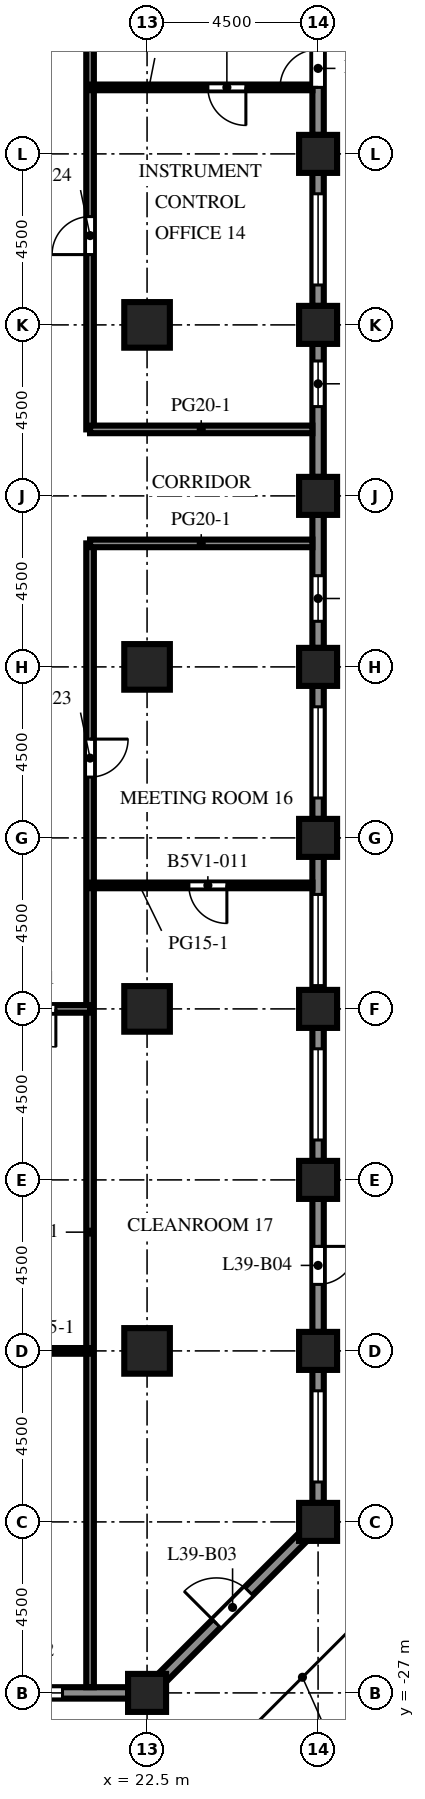
"""IFC4 building model, lengths in metres.
Left out: names, types, materials, properties, quantities, classifications, styles, units other than length and angle.
Written with IfcOpenShell. Run it as: python <this file> out.ifc"""

import sys

from ifc_helpers import new_model, si_unit, direction, frame, frame_2d, origin, origin_2d, place, context, subcontext, project, spatial, rectangle, extrude, element, fill, save


model = new_model("IFC4")
c1 = context("Model", 3, precision=1e-05, world=origin(), true_north=direction((0.0, 1.0)))
c2 = subcontext(c1, "Body", "Model", "MODEL_VIEW")
j1 = project(units=[si_unit("LENGTHUNIT", "METRE"), si_unit("PLANEANGLEUNIT", "RADIAN")], contexts=[c1])
p1 = place(None, origin())
s1 = spatial("IfcSite", under=j1, at=p1, CompositionType="ELEMENT")
p2 = place(p1, origin())
s2 = spatial("IfcBuilding", under=s1, at=p2, CompositionType="ELEMENT")
p3 = place(p2, frame((0.0, 0.0, 173.2)))
s3 = spatial("IfcBuildingStorey", under=s2, at=p3, CompositionType="ELEMENT", Elevation=173.2)
for number, where, z_axis, x_axis in (
    (1, (22.5, -27.0, 0.0), (0.0, 0.0, 1.0), (1.0, 0.0, 0.0)),
    (2, (27.0, -22.5, 0.0), (0.0, 0.0, 1.0), (1.0, 0.0, 0.0)),
    (3, (27.0, -18.0, 0.0), (0.0, 0.0, 1.0), (1.0, 0.0, 0.0)),
    (4, (27.0, -13.5, 0.0), (0.0, 0.0, 1.0), (1.0, 0.0, 0.0)),
    (5, (27.0, -9.0, 0.0), (0.0, 0.0, 1.0), (1.0, 0.0, 0.0)),
    (6, (27.0, -4.5, 0.0), (0.0, 0.0, 1.0), (1.0, 0.0, 0.0)),
    (7, (27.0, 0.0, 0.0), (0.0, 0.0, 1.0), (1.0, 0.0, 0.0)),
    (8, (27.0, 4.5, 0.0), (0.0, 0.0, 1.0), (1.0, 0.0, 0.0)),
    (9, (27.0, 9.0, 0.0), (0.0, 0.0, 1.0), (1.0, 0.0, 0.0)),
    (10, (27.0, 13.5, 0.0), (0.0, 0.0, 1.0), (1.0, 0.0, 0.0)),
):
    element("IfcColumn", number, at=place(p3, frame(where, z_axis=z_axis, x_axis=x_axis)), inside=s3, PredefinedType="COLUMN", context=c2, shape_type="SweptSolid", body=[
        extrude(rectangle(XDim=1.0, YDim=1.0, at=origin_2d()), origin(), (0.0, 0.0, 1.0), 4.1),
    ])
for number, where, z_axis, x_axis in (
    (11, (22.5, -18.0, 0.0), (0.0, 0.0, 1.0), (1.0, 0.0, 0.0)),
    (12, (22.5, -9.0, 0.0), (0.0, 0.0, 1.0), (1.0, 0.0, 0.0)),
    (13, (22.5, 0.0, 0.0), (0.0, 0.0, 1.0), (1.0, 0.0, 0.0)),
    (14, (22.5, 9.0, 0.0), (0.0, 0.0, 1.0), (1.0, 0.0, 0.0)),
):
    element("IfcColumn", number, at=place(p3, frame(where, z_axis=z_axis, x_axis=x_axis)), inside=s3, PredefinedType="COLUMN", context=c2, shape_type="SweptSolid", body=[
        extrude(rectangle(XDim=1.2, YDim=1.2, at=origin_2d()), origin(), (0.0, 0.0, 1.0), 4.1),
    ])
p4 = place(p3, frame((22.0, -27.0, 0.0), z_axis=(0.0, 0.0, 1.0), x_axis=(-1.0, 0.0, 0.0)))
e15 = element("IfcWall", 15, at=p4, inside=s3, PredefinedType="SOLIDWALL", context=c2, shape_type="SweptSolid", body=[
    extrude(rectangle(XDim=3.5, YDim=0.3, at=frame_2d((1.75, 0.0))), origin(), (0.0, 0.0, 1.0), 2.85),
])
p5 = place(p4, frame((1.725, 0.0, 0.8)))
e16 = element("IfcOpeningElement", 16, at=p5, cuts=e15, PredefinedType="OPENING", context=c2, shape_type="SweptSolid", body=[
    extrude(rectangle(XDim=1.2, YDim=1.7, at=frame_2d((0.6, 0.85))), frame((0.0, 0.16, 0.0), z_axis=(0.0, -1.0, 0.0), x_axis=(1.0, 0.0, 0.0)), (0.0, 0.0, 1.0), 0.32),
])
p6 = place(p3, frame((26.606, -22.894, 0.0), z_axis=(0.0, 0.0, 1.0), x_axis=(-0.707106781187, -0.707106781187, 0.0)))
e17 = element("IfcWall", 17, at=p6, inside=s3, PredefinedType="SOLIDWALL", context=c2, shape_type="SweptSolid", body=[
    extrude(rectangle(XDim=5.25, YDim=0.3, at=frame_2d((2.625, 0.0))), origin(), (0.0, 0.0, 1.0), 2.85),
])
p7 = place(p6, frame((2.025, 0.0, 0.0)))
e18 = element("IfcOpeningElement", 18, at=p7, cuts=e17, PredefinedType="OPENING", context=c2, shape_type="SweptSolid", body=[
    extrude(rectangle(XDim=1.2, YDim=2.2, at=frame_2d((0.6, 1.1))), frame((0.0, 0.16, 0.0), z_axis=(0.0, -1.0, 0.0), x_axis=(1.0, 0.0, 0.0)), (0.0, 0.0, 1.0), 0.32),
])
p8 = place(p3, frame((27.0, -18.5, 0.0), z_axis=(0.0, 0.0, 1.0), x_axis=(0.0, -1.0, 0.0)))
e19 = element("IfcWall", 19, at=p8, inside=s3, PredefinedType="SOLIDWALL", context=c2, shape_type="SweptSolid", body=[
    extrude(rectangle(XDim=3.5, YDim=0.3, at=frame_2d((1.75, 0.0))), origin(), (0.0, 0.0, 1.0), 2.85),
])
p9 = place(p8, frame((0.55, 0.0, 0.8)))
e20 = element("IfcOpeningElement", 20, at=p9, cuts=e19, PredefinedType="OPENING", context=c2, shape_type="SweptSolid", body=[
    extrude(rectangle(XDim=2.4, YDim=1.7, at=frame_2d((1.2, 0.85))), frame((0.0, 0.16, 0.0), z_axis=(0.0, -1.0, 0.0), x_axis=(1.0, 0.0, 0.0)), (0.0, 0.0, 1.0), 0.32),
])
p10 = place(p3, frame((27.0, -14.0, 0.0), z_axis=(0.0, 0.0, 1.0), x_axis=(0.0, -1.0, 0.0)))
e21 = element("IfcWall", 21, at=p10, inside=s3, PredefinedType="SOLIDWALL", context=c2, shape_type="SweptSolid", body=[
    extrude(rectangle(XDim=3.5, YDim=0.3, at=frame_2d((1.75, 0.0))), origin(), (0.0, 0.0, 1.0), 2.85),
])
p11 = place(p10, frame((1.25, 0.0, 0.0)))
e22 = element("IfcOpeningElement", 22, at=p11, cuts=e21, PredefinedType="OPENING", context=c2, shape_type="SweptSolid", body=[
    extrude(rectangle(XDim=1.0, YDim=2.2, at=frame_2d((0.5, 1.1))), frame((0.0, 0.16, 0.0), z_axis=(0.0, -1.0, 0.0), x_axis=(1.0, 0.0, 0.0)), (0.0, 0.0, 1.0), 0.32),
])
p12 = place(p3, frame((27.0, -9.5, 0.0), z_axis=(0.0, 0.0, 1.0), x_axis=(0.0, -1.0, 0.0)))
e23 = element("IfcWall", 23, at=p12, inside=s3, PredefinedType="SOLIDWALL", context=c2, shape_type="SweptSolid", body=[
    extrude(rectangle(XDim=3.5, YDim=0.3, at=frame_2d((1.75, 0.0))), origin(), (0.0, 0.0, 1.0), 2.85),
])
p13 = place(p12, frame((0.55, 0.0, 0.8)))
e24 = element("IfcOpeningElement", 24, at=p13, cuts=e23, PredefinedType="OPENING", context=c2, shape_type="SweptSolid", body=[
    extrude(rectangle(XDim=2.4, YDim=1.7, at=frame_2d((1.2, 0.85))), frame((0.0, 0.16, 0.0), z_axis=(0.0, -1.0, 0.0), x_axis=(1.0, 0.0, 0.0)), (0.0, 0.0, 1.0), 0.32),
])
p14 = place(p3, frame((27.0, -5.0, 0.0), z_axis=(0.0, 0.0, 1.0), x_axis=(0.0, -1.0, 0.0)))
e25 = element("IfcWall", 25, at=p14, inside=s3, PredefinedType="SOLIDWALL", context=c2, shape_type="SweptSolid", body=[
    extrude(rectangle(XDim=3.5, YDim=0.3, at=frame_2d((1.75, 0.0))), origin(), (0.0, 0.0, 1.0), 2.85),
])
p15 = place(p14, frame((0.988, 0.0, 0.8)))
e26 = element("IfcOpeningElement", 26, at=p15, cuts=e25, PredefinedType="OPENING", context=c2, shape_type="SweptSolid", body=[
    extrude(rectangle(XDim=2.4, YDim=1.7, at=frame_2d((1.2, 0.85))), frame((0.0, 0.16, 0.0), z_axis=(0.0, -1.0, 0.0), x_axis=(1.0, 0.0, 0.0)), (0.0, 0.0, 1.0), 0.32),
])
p16 = place(p3, frame((27.0, -0.5, 0.0), z_axis=(0.0, 0.0, 1.0), x_axis=(0.0, -1.0, 0.0)))
e27 = element("IfcWall", 27, at=p16, inside=s3, PredefinedType="SOLIDWALL", context=c2, shape_type="SweptSolid", body=[
    extrude(rectangle(XDim=3.5, YDim=0.3, at=frame_2d((1.75, 0.0))), origin(), (0.0, 0.0, 1.0), 2.85),
])
p17 = place(p16, frame((0.55, 0.0, 0.8)))
e28 = element("IfcOpeningElement", 28, at=p17, cuts=e27, PredefinedType="OPENING", context=c2, shape_type="SweptSolid", body=[
    extrude(rectangle(XDim=2.4, YDim=1.7, at=frame_2d((1.2, 0.85))), frame((0.0, 0.16, 0.0), z_axis=(0.0, -1.0, 0.0), x_axis=(1.0, 0.0, 0.0)), (0.0, 0.0, 1.0), 0.32),
])
p18 = place(p3, frame((27.0, 4.0, 0.0), z_axis=(0.0, 0.0, 1.0), x_axis=(0.0, -1.0, 0.0)))
e29 = element("IfcWall", 29, at=p18, inside=s3, PredefinedType="SOLIDWALL", context=c2, shape_type="SweptSolid", body=[
    extrude(rectangle(XDim=3.5, YDim=0.3, at=frame_2d((1.75, 0.0))), origin(), (0.0, 0.0, 1.0), 2.85),
])
p19 = place(p18, frame((1.6, 0.0, 0.8)))
e30 = element("IfcOpeningElement", 30, at=p19, cuts=e29, PredefinedType="OPENING", context=c2, shape_type="SweptSolid", body=[
    extrude(rectangle(XDim=1.2, YDim=1.7, at=frame_2d((0.6, 0.85))), frame((0.0, 0.16, 0.0), z_axis=(0.0, -1.0, 0.0), x_axis=(1.0, 0.0, 0.0)), (0.0, 0.0, 1.0), 0.32),
])
p20 = place(p3, frame((27.0, 8.5, 0.0), z_axis=(0.0, 0.0, 1.0), x_axis=(0.0, -1.0, 0.0)))
e31 = element("IfcWall", 31, at=p20, inside=s3, PredefinedType="SOLIDWALL", context=c2, shape_type="SweptSolid", body=[
    extrude(rectangle(XDim=3.5, YDim=0.3, at=frame_2d((1.75, 0.0))), origin(), (0.0, 0.0, 1.0), 2.85),
])
p21 = place(p20, frame((0.45, 0.0, 0.8)))
e32 = element("IfcOpeningElement", 32, at=p21, cuts=e31, PredefinedType="OPENING", context=c2, shape_type="SweptSolid", body=[
    extrude(rectangle(XDim=1.2, YDim=1.7, at=frame_2d((0.6, 0.85))), frame((0.0, 0.16, 0.0), z_axis=(0.0, -1.0, 0.0), x_axis=(1.0, 0.0, 0.0)), (0.0, 0.0, 1.0), 0.32),
])
p22 = place(p3, frame((27.0, 13.0, 0.0), z_axis=(0.0, 0.0, 1.0), x_axis=(0.0, -1.0, 0.0)))
e33 = element("IfcWall", 33, at=p22, inside=s3, PredefinedType="SOLIDWALL", context=c2, shape_type="SweptSolid", body=[
    extrude(rectangle(XDim=3.5, YDim=0.3, at=frame_2d((1.75, 0.0))), origin(), (0.0, 0.0, 1.0), 2.85),
])
p23 = place(p22, frame((0.55, 0.0, 0.8)))
e34 = element("IfcOpeningElement", 34, at=p23, cuts=e33, PredefinedType="OPENING", context=c2, shape_type="SweptSolid", body=[
    extrude(rectangle(XDim=2.4, YDim=1.7, at=frame_2d((1.2, 0.85))), frame((0.0, 0.16, 0.0), z_axis=(0.0, -1.0, 0.0), x_axis=(1.0, 0.0, 0.0)), (0.0, 0.0, 1.0), 0.32),
])
p24 = place(p3, frame((27.0, 17.5, 0.0), z_axis=(0.0, 0.0, 1.0), x_axis=(0.0, -1.0, 0.0)))
e35 = element("IfcWall", 35, at=p24, inside=s3, PredefinedType="SOLIDWALL", context=c2, shape_type="SweptSolid", body=[
    extrude(rectangle(XDim=3.5, YDim=0.3, at=frame_2d((1.75, 0.0))), origin(), (0.0, 0.0, 1.0), 2.85),
])
p25 = place(p24, frame((1.25, 0.0, 0.0)))
e36 = element("IfcOpeningElement", 36, at=p25, cuts=e35, PredefinedType="OPENING", context=c2, shape_type="SweptSolid", body=[
    extrude(rectangle(XDim=1.0, YDim=2.2, at=frame_2d((0.5, 1.1))), frame((0.0, 0.16, 0.0), z_axis=(0.0, -1.0, 0.0), x_axis=(1.0, 0.0, 0.0)), (0.0, 0.0, 1.0), 0.32),
])
p26 = place(p3, frame((21.0, 3.25, 0.0), z_axis=(0.0, 0.0, 1.0), x_axis=(0.0, -1.0, 0.0)))
e37 = element("IfcWall", 37, at=p26, inside=s3, PredefinedType="PARTITIONING", context=c2, shape_type="SweptSolid", body=[
    extrude(rectangle(XDim=30.1, YDim=0.2, at=frame_2d((15.05, 0.0))), origin(), (0.0, 0.0, 1.0), 3.65),
])
p27 = place(p26, frame((5.15, 0.0, 0.0)))
e38 = element("IfcOpeningElement", 38, at=p27, cuts=e37, PredefinedType="OPENING", context=c2, shape_type="SweptSolid", body=[
    extrude(rectangle(XDim=1.0, YDim=2.1, at=frame_2d((0.5, 1.05))), frame((0.0, 0.11, 0.0), z_axis=(0.0, -1.0, 0.0), x_axis=(1.0, 0.0, 0.0)), (0.0, 0.0, 1.0), 0.22),
])
p28 = place(p3, frame((21.0, 26.85, 0.0), z_axis=(0.0, 0.0, 1.0), x_axis=(0.0, -1.0, 0.0)))
e39 = element("IfcWall", 39, at=p28, inside=s3, PredefinedType="PARTITIONING", context=c2, shape_type="SweptSolid", body=[
    extrude(rectangle(XDim=20.6, YDim=0.2, at=frame_2d((10.3, 0.0))), origin(), (0.0, 0.0, 1.0), 3.65),
])
p29 = place(p28, frame((15.0, 0.0, 0.0)))
e40 = element("IfcOpeningElement", 40, at=p29, cuts=e39, PredefinedType="OPENING", context=c2, shape_type="SweptSolid", body=[
    extrude(rectangle(XDim=1.0, YDim=2.1, at=frame_2d((0.5, 1.05))), frame((0.0, 0.11, 0.0), z_axis=(0.0, -1.0, 0.0), x_axis=(1.0, 0.0, 0.0)), (0.0, 0.0, 1.0), 0.22),
])
p30 = place(p3, frame((18.6, -18.0, 0.0), z_axis=(0.0, 0.0, 1.0), x_axis=(1.0, 0.0, 0.0)))
e41 = element("IfcWall", 41, at=p30, inside=s3, PredefinedType="PARTITIONING", context=c2, shape_type="SweptSolid", body=[
    extrude(rectangle(XDim=2.4, YDim=0.15, at=frame_2d((1.2, 0.0))), origin(), (0.0, 0.0, 1.0), 3.65),
])
p31 = place(p3, frame((21.0, -9.0, 0.0), z_axis=(0.0, 0.0, 1.0), x_axis=(-1.0, 0.0, 0.0)))
e42 = element("IfcWall", 42, at=p31, inside=s3, PredefinedType="PARTITIONING", context=c2, shape_type="SweptSolid", body=[
    extrude(rectangle(XDim=3.0, YDim=0.2, at=frame_2d((1.5, 0.0))), origin(), (0.0, 0.0, 1.0), 3.65),
])
p32 = place(p31, frame((0.9, 0.0, 0.0)))
e43 = element("IfcOpeningElement", 43, at=p32, cuts=e42, PredefinedType="OPENING", context=c2, shape_type="SweptSolid", body=[
    extrude(rectangle(XDim=1.0, YDim=2.1, at=frame_2d((0.5, 1.05))), frame((0.0, 0.11, 0.0), z_axis=(0.0, -1.0, 0.0), x_axis=(1.0, 0.0, 0.0)), (0.0, 0.0, 1.0), 0.22),
])
p33 = place(p3, frame((26.85, -5.75, 0.0), z_axis=(0.0, 0.0, 1.0), x_axis=(-1.0, 0.0, 0.0)))
e44 = element("IfcWall", 44, at=p33, inside=s3, PredefinedType="PARTITIONING", context=c2, shape_type="SweptSolid", body=[
    extrude(rectangle(XDim=5.85, YDim=0.15, at=frame_2d((2.925, 0.0))), origin(), (0.0, 0.0, 1.0), 3.65),
])
p34 = place(p33, frame((2.25, 0.0, 0.0)))
e45 = element("IfcOpeningElement", 45, at=p34, cuts=e44, PredefinedType="OPENING", context=c2, shape_type="SweptSolid", body=[
    extrude(rectangle(XDim=1.0, YDim=2.1, at=frame_2d((0.5, 1.05))), frame((0.0, 0.085, 0.0), z_axis=(0.0, -1.0, 0.0), x_axis=(1.0, 0.0, 0.0)), (0.0, 0.0, 1.0), 0.17),
])
for number, where, z_axis, x_axis in (
    (46, (21.0, 3.25, 0.0), (0.0, 0.0, 1.0), (1.0, 0.0, 0.0)),
    (47, (21.0, 6.25, 0.0), (0.0, 0.0, 1.0), (1.0, 0.0, 0.0)),
):
    element("IfcWall", number, at=place(p3, frame(where, z_axis=z_axis, x_axis=x_axis)), inside=s3, PredefinedType="PARTITIONING", context=c2, shape_type="SweptSolid", body=[
        extrude(rectangle(XDim=5.85, YDim=0.2, at=frame_2d((2.925, 0.0))), origin(), (0.0, 0.0, 1.0), 3.65),
    ])
p35 = place(p3, frame((21.0, 15.25, 0.0), z_axis=(0.0, 0.0, 1.0), x_axis=(1.0, 0.0, 0.0)))
e48 = element("IfcWall", 48, at=p35, inside=s3, PredefinedType="PARTITIONING", context=c2, shape_type="SweptSolid", body=[
    extrude(rectangle(XDim=5.85, YDim=0.15, at=frame_2d((2.925, 0.0))), origin(), (0.0, 0.0, 1.0), 3.65),
])
p36 = place(p35, frame((3.1, 0.0, 0.0)))
e49 = element("IfcOpeningElement", 49, at=p36, cuts=e48, PredefinedType="OPENING", context=c2, shape_type="SweptSolid", body=[
    extrude(rectangle(XDim=1.0, YDim=2.1, at=frame_2d((0.5, 1.05))), frame((0.0, 0.085, 0.0), z_axis=(0.0, -1.0, 0.0), x_axis=(1.0, 0.0, 0.0)), (0.0, 0.0, 1.0), 0.17),
])
p37 = place(p5, origin())
e50 = element("IfcWindow", 50, at=p37, inside=s3, PartitioningType="SINGLE_PANEL", PredefinedType="WINDOW", context=c2, shape_type="SweptSolid", body=[
    extrude(rectangle(XDim=1.2, YDim=1.7, at=frame_2d((0.6, 0.85))), frame((0.0, 0.03, 0.0), z_axis=(0.0, -1.0, 0.0), x_axis=(1.0, 0.0, 0.0)), (0.0, 0.0, 1.0), 0.06),
])
fill(e16, e50)
p38 = place(p7, origin())
e51 = element("IfcDoor", 51, at=p38, inside=s3, OperationType="SINGLE_SWING_RIGHT", PredefinedType="DOOR", context=c2, shape_type="SweptSolid", body=[
    extrude(rectangle(XDim=1.2, YDim=2.2, at=frame_2d((0.6, 1.1))), frame((0.0, 0.025, 0.0), z_axis=(0.0, -1.0, 0.0), x_axis=(1.0, 0.0, 0.0)), (0.0, 0.0, 1.0), 0.05),
])
fill(e18, e51)
p39 = place(p9, origin())
e52 = element("IfcWindow", 52, at=p39, inside=s3, PartitioningType="SINGLE_PANEL", PredefinedType="WINDOW", context=c2, shape_type="SweptSolid", body=[
    extrude(rectangle(XDim=2.4, YDim=1.7, at=frame_2d((1.2, 0.85))), frame((0.0, 0.03, 0.0), z_axis=(0.0, -1.0, 0.0), x_axis=(1.0, 0.0, 0.0)), (0.0, 0.0, 1.0), 0.06),
])
fill(e20, e52)
p40 = place(p11, origin())
e53 = element("IfcDoor", 53, at=p40, inside=s3, OperationType="SINGLE_SWING_LEFT", PredefinedType="DOOR", context=c2, shape_type="SweptSolid", body=[
    extrude(rectangle(XDim=1.0, YDim=2.2, at=frame_2d((0.5, 1.1))), frame((0.0, 0.025, 0.0), z_axis=(0.0, -1.0, 0.0), x_axis=(1.0, 0.0, 0.0)), (0.0, 0.0, 1.0), 0.05),
])
fill(e22, e53)
p41 = place(p13, origin())
e54 = element("IfcWindow", 54, at=p41, inside=s3, PartitioningType="SINGLE_PANEL", PredefinedType="WINDOW", context=c2, shape_type="SweptSolid", body=[
    extrude(rectangle(XDim=2.4, YDim=1.7, at=frame_2d((1.2, 0.85))), frame((0.0, 0.03, 0.0), z_axis=(0.0, -1.0, 0.0), x_axis=(1.0, 0.0, 0.0)), (0.0, 0.0, 1.0), 0.06),
])
fill(e24, e54)
p42 = place(p15, origin())
e55 = element("IfcWindow", 55, at=p42, inside=s3, PartitioningType="SINGLE_PANEL", PredefinedType="WINDOW", context=c2, shape_type="SweptSolid", body=[
    extrude(rectangle(XDim=2.4, YDim=1.7, at=frame_2d((1.2, 0.85))), frame((0.0, 0.03, 0.0), z_axis=(0.0, -1.0, 0.0), x_axis=(1.0, 0.0, 0.0)), (0.0, 0.0, 1.0), 0.06),
])
fill(e26, e55)
p43 = place(p17, origin())
e56 = element("IfcWindow", 56, at=p43, inside=s3, PartitioningType="SINGLE_PANEL", PredefinedType="WINDOW", context=c2, shape_type="SweptSolid", body=[
    extrude(rectangle(XDim=2.4, YDim=1.7, at=frame_2d((1.2, 0.85))), frame((0.0, 0.03, 0.0), z_axis=(0.0, -1.0, 0.0), x_axis=(1.0, 0.0, 0.0)), (0.0, 0.0, 1.0), 0.06),
])
fill(e28, e56)
p44 = place(p19, origin())
e57 = element("IfcWindow", 57, at=p44, inside=s3, PartitioningType="SINGLE_PANEL", PredefinedType="WINDOW", context=c2, shape_type="SweptSolid", body=[
    extrude(rectangle(XDim=1.2, YDim=1.7, at=frame_2d((0.6, 0.85))), frame((0.0, 0.03, 0.0), z_axis=(0.0, -1.0, 0.0), x_axis=(1.0, 0.0, 0.0)), (0.0, 0.0, 1.0), 0.06),
])
fill(e30, e57)
p45 = place(p21, origin())
e58 = element("IfcWindow", 58, at=p45, inside=s3, PartitioningType="SINGLE_PANEL", PredefinedType="WINDOW", context=c2, shape_type="SweptSolid", body=[
    extrude(rectangle(XDim=1.2, YDim=1.7, at=frame_2d((0.6, 0.85))), frame((0.0, 0.03, 0.0), z_axis=(0.0, -1.0, 0.0), x_axis=(1.0, 0.0, 0.0)), (0.0, 0.0, 1.0), 0.06),
])
fill(e32, e58)
p46 = place(p23, origin())
e59 = element("IfcWindow", 59, at=p46, inside=s3, PartitioningType="SINGLE_PANEL", PredefinedType="WINDOW", context=c2, shape_type="SweptSolid", body=[
    extrude(rectangle(XDim=2.4, YDim=1.7, at=frame_2d((1.2, 0.85))), frame((0.0, 0.03, 0.0), z_axis=(0.0, -1.0, 0.0), x_axis=(1.0, 0.0, 0.0)), (0.0, 0.0, 1.0), 0.06),
])
fill(e34, e59)
p47 = place(p25, origin())
e60 = element("IfcDoor", 60, at=p47, inside=s3, OperationType="SINGLE_SWING_RIGHT", PredefinedType="DOOR", context=c2, shape_type="SweptSolid", body=[
    extrude(rectangle(XDim=1.0, YDim=2.2, at=frame_2d((0.5, 1.1))), frame((0.0, 0.025, 0.0), z_axis=(0.0, -1.0, 0.0), x_axis=(1.0, 0.0, 0.0)), (0.0, 0.0, 1.0), 0.05),
])
fill(e36, e60)
p48 = place(p32, origin())
e61 = element("IfcDoor", 61, at=p48, inside=s3, OperationType="SINGLE_SWING_LEFT", PredefinedType="DOOR", context=c2, shape_type="SweptSolid", body=[
    extrude(rectangle(XDim=1.0, YDim=2.1, at=frame_2d((0.5, 1.05))), frame((0.0, 0.025, 0.0), z_axis=(0.0, -1.0, 0.0), x_axis=(1.0, 0.0, 0.0)), (0.0, 0.0, 1.0), 0.05),
])
fill(e43, e61)
p49 = place(p34, origin())
e62 = element("IfcDoor", 62, at=p49, inside=s3, OperationType="SINGLE_SWING_LEFT", PredefinedType="DOOR", context=c2, shape_type="SweptSolid", body=[
    extrude(rectangle(XDim=1.0, YDim=2.1, at=frame_2d((0.5, 1.05))), frame((0.0, 0.025, 0.0), z_axis=(0.0, -1.0, 0.0), x_axis=(1.0, 0.0, 0.0)), (0.0, 0.0, 1.0), 0.05),
])
fill(e45, e62)
p50 = place(p36, origin())
e63 = element("IfcDoor", 63, at=p50, inside=s3, OperationType="SINGLE_SWING_RIGHT", PredefinedType="DOOR", context=c2, shape_type="SweptSolid", body=[
    extrude(rectangle(XDim=1.0, YDim=2.1, at=frame_2d((0.5, 1.05))), frame((0.0, 0.025, 0.0), z_axis=(0.0, -1.0, 0.0), x_axis=(1.0, 0.0, 0.0)), (0.0, 0.0, 1.0), 0.05),
])
fill(e49, e63)
p51 = place(p27, origin())
e64 = element("IfcDoor", 64, at=p51, inside=s3, OperationType="SINGLE_SWING_LEFT", PredefinedType="DOOR", context=c2, shape_type="SweptSolid", body=[
    extrude(rectangle(XDim=1.0, YDim=2.1, at=frame_2d((0.5, 1.05))), frame((0.0, 0.025, 0.0), z_axis=(0.0, -1.0, 0.0), x_axis=(1.0, 0.0, 0.0)), (0.0, 0.0, 1.0), 0.05),
])
fill(e38, e64)
p52 = place(p29, origin())
e65 = element("IfcDoor", 65, at=p52, inside=s3, OperationType="SINGLE_SWING_RIGHT", PredefinedType="DOOR", context=c2, shape_type="SweptSolid", body=[
    extrude(rectangle(XDim=1.0, YDim=2.1, at=frame_2d((0.5, 1.05))), frame((0.0, 0.025, 0.0), z_axis=(0.0, -1.0, 0.0), x_axis=(1.0, 0.0, 0.0)), (0.0, 0.0, 1.0), 0.05),
])
fill(e40, e65)
save(model, sys.argv[1])
